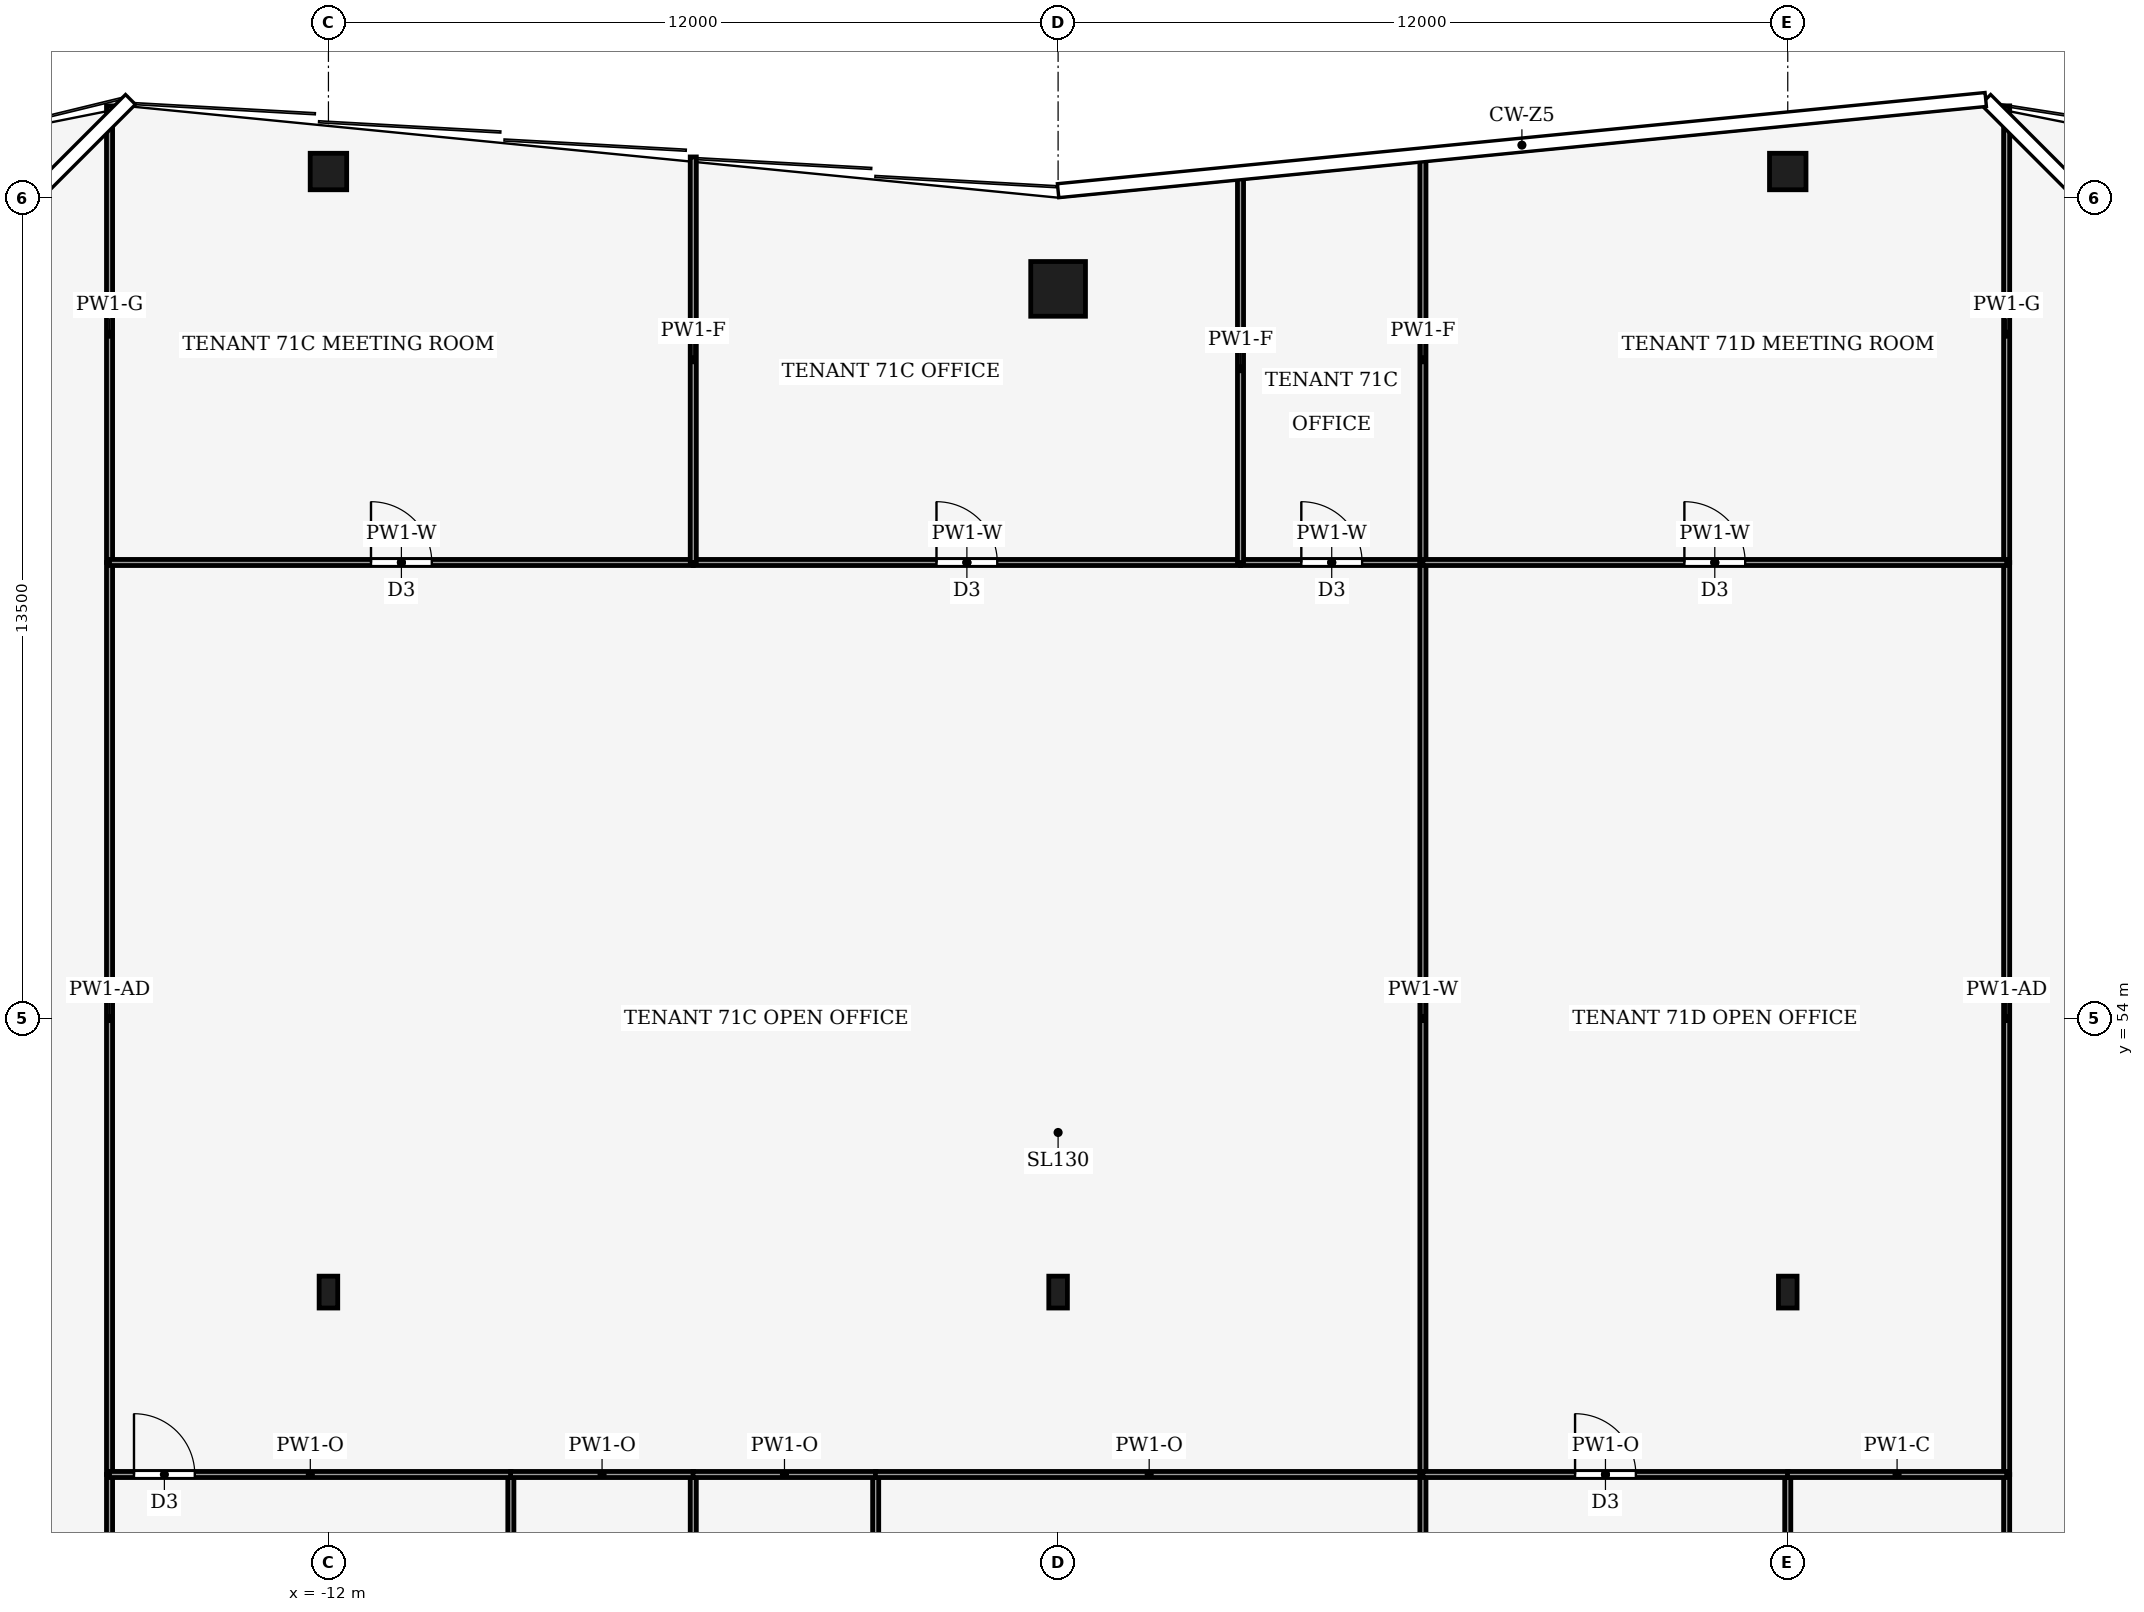
"""IFC4 building model, lengths in metres.
Left out: names, types, materials, properties, quantities, classifications, styles, units other than length and angle.
Written with IfcOpenShell. Run it as: python <this file> out.ifc"""

import sys

from ifc_helpers import new_model, si_unit, direction, frame, frame_2d, origin, origin_2d, place, context, subcontext, project, spatial, rectangle, hollow_rectangle, i_section, extrude, element, fill, save


model = new_model("IFC4")
c1 = context("Model", 3, precision=1e-05, world=origin(), true_north=direction((0.0, 1.0)))
c2 = subcontext(c1, "Body", "Model", "MODEL_VIEW")
j1 = project(units=[si_unit("LENGTHUNIT", "METRE"), si_unit("PLANEANGLEUNIT", "RADIAN")], contexts=[c1])
p1 = place(None, origin())
s1 = spatial("IfcSite", under=j1, at=p1, CompositionType="ELEMENT")
p2 = place(p1, origin())
s2 = spatial("IfcBuilding", under=s1, at=p2, CompositionType="ELEMENT")
p3 = place(p2, frame((0.0, 0.0, 310.0)))
s3 = spatial("IfcBuildingStorey", under=s2, at=p3, CompositionType="ELEMENT", Elevation=310.0)
p4 = place(p3, frame((0.0, 66.0, 0.0), z_axis=(0.0, 0.0, 1.0), x_axis=(1.0, 0.0, 0.0)))
e1 = element("IfcColumn", 1, at=p4, inside=s3, PredefinedType="COLUMN", context=c2, shape_type="SweptSolid", body=[
    extrude(hollow_rectangle(XDim=0.9, YDim=0.9, WallThickness=0.04, at=origin_2d()), origin(), (0.0, 0.0, 1.0), 4.0),
])
for number, where, z_axis, x_axis in (
    (2, (-12.0, 67.93, 0.0), (0.0, 0.0, 1.0), (1.0, 0.0, 0.0)),
    (3, (12.0, 67.93, 0.0), (0.0, 0.0, 1.0), (1.0, 0.0, 0.0)),
):
    element("IfcColumn", number, at=place(p3, frame(where, z_axis=z_axis, x_axis=x_axis)), inside=s3, PredefinedType="COLUMN", context=c2, shape_type="SweptSolid", body=[
        extrude(hollow_rectangle(XDim=0.6, YDim=0.6, WallThickness=0.025, at=origin_2d()), origin(), (0.0, 0.0, 1.0), 4.0),
    ])
for number, where, z_axis, x_axis in (
    (4, (-12.0, 49.5, 0.0), (0.0, 0.0, 1.0), (1.0, 0.0, 0.0)),
    (5, (0.0, 49.5, 0.0), (0.0, 0.0, 1.0), (1.0, 0.0, 0.0)),
    (6, (12.0, 49.5, 0.0), (0.0, 0.0, 1.0), (1.0, 0.0, 0.0)),
):
    element("IfcColumn", number, at=place(p3, frame(where, z_axis=z_axis, x_axis=x_axis)), inside=s3, PredefinedType="COLUMN", context=c2, shape_type="SweptSolid", body=[
        extrude(i_section(OverallWidth=0.306, OverallDepth=0.524, WebThickness=0.012, FlangeThickness=0.04, FilletRadius=0.027, at=origin_2d()), origin(), (0.0, 0.0, 1.0), 4.0),
    ])
p5 = place(p3, frame((-15.6, 40.6, 0.0), z_axis=(0.0, 0.0, 1.0), x_axis=(0.0, 1.0, 0.0)))
e7 = element("IfcWall", 7, at=p5, inside=s3, PredefinedType="PARTITIONING", context=c2, shape_type="SweptSolid", body=[
    extrude(rectangle(XDim=5.9, YDim=0.1, at=frame_2d((2.95, 0.0))), origin(), (0.0, 0.0, 1.0), 3.87),
])
p6 = place(p3, frame((-15.6, 46.5, 0.0), z_axis=(0.0, 0.0, 1.0), x_axis=(0.0, 1.0, 0.0)))
e8 = element("IfcWall", 8, at=p6, inside=s3, PredefinedType="PARTITIONING", context=c2, shape_type="SweptSolid", body=[
    extrude(rectangle(XDim=15.0, YDim=0.1, at=frame_2d((7.5, 0.0))), origin(), (0.0, 0.0, 1.0), 3.35),
])
p7 = place(p3, frame((-15.6, 61.5, 0.0), z_axis=(0.0, 0.0, 1.0), x_axis=(0.0, 1.0, 0.0)))
e9 = element("IfcWall", 9, at=p7, inside=s3, PredefinedType="PARTITIONING", context=c2, shape_type="SweptSolid", body=[
    extrude(rectangle(XDim=7.51, YDim=0.1, at=frame_2d((3.755, 0.0))), origin(), (0.0, 0.0, 1.0), 2.93),
])
p8 = place(p3, frame((15.6, 46.5, 0.0), z_axis=(0.0, 0.0, 1.0), x_axis=(0.0, -1.0, 0.0)))
e10 = element("IfcWall", 10, at=p8, inside=s3, PredefinedType="PARTITIONING", context=c2, shape_type="SweptSolid", body=[
    extrude(rectangle(XDim=5.9, YDim=0.1, at=frame_2d((2.95, 0.0))), origin(), (0.0, 0.0, 1.0), 3.87),
])
p9 = place(p3, frame((15.6, 61.5, 0.0), z_axis=(0.0, 0.0, 1.0), x_axis=(0.0, -1.0, 0.0)))
e11 = element("IfcWall", 11, at=p9, inside=s3, PredefinedType="PARTITIONING", context=c2, shape_type="SweptSolid", body=[
    extrude(rectangle(XDim=15.0, YDim=0.1, at=frame_2d((7.5, 0.0))), origin(), (0.0, 0.0, 1.0), 3.35),
])
p10 = place(p3, frame((15.6, 69.01, 0.0), z_axis=(0.0, 0.0, 1.0), x_axis=(0.0, -1.0, 0.0)))
e12 = element("IfcWall", 12, at=p10, inside=s3, PredefinedType="PARTITIONING", context=c2, shape_type="SweptSolid", body=[
    extrude(rectangle(XDim=7.51, YDim=0.1, at=frame_2d((3.755, 0.0))), origin(), (0.0, 0.0, 1.0), 2.93),
])
p11 = place(p3, frame((-9.0, 46.5, 0.0), z_axis=(0.0, 0.0, 1.0), x_axis=(0.0, -1.0, 0.0)))
e13 = element("IfcWall", 13, at=p11, inside=s3, PredefinedType="PARTITIONING", context=c2, shape_type="SweptSolid", body=[
    extrude(rectangle(XDim=5.9, YDim=0.1, at=frame_2d((2.95, 0.0))), origin(), (0.0, 0.0, 1.0), 3.87),
])
p12 = place(p11, frame((2.45, 0.0, 0.0)))
e14 = element("IfcOpeningElement", 14, at=p12, cuts=e13, PredefinedType="OPENING", context=c2, shape_type="SweptSolid", body=[
    extrude(rectangle(XDim=1.0, YDim=2.1, at=frame_2d((0.5, 1.05))), frame((0.0, 0.06, 0.0), z_axis=(0.0, -1.0, 0.0), x_axis=(1.0, 0.0, 0.0)), (0.0, 0.0, 1.0), 0.12),
])
p13 = place(p3, frame((-15.6, 46.5, 0.0), z_axis=(0.0, 0.0, 1.0), x_axis=(1.0, 0.0, 0.0)))
e15 = element("IfcWall", 15, at=p13, inside=s3, PredefinedType="PARTITIONING", context=c2, shape_type="SweptSolid", body=[
    extrude(rectangle(XDim=6.604, YDim=0.1, at=frame_2d((3.302, 0.0))), origin(), (0.0, 0.0, 1.0), 3.39),
])
p14 = place(p13, frame((0.402, 0.0, 0.0)))
e16 = element("IfcOpeningElement", 16, at=p14, cuts=e15, PredefinedType="OPENING", context=c2, shape_type="SweptSolid", body=[
    extrude(rectangle(XDim=1.0, YDim=2.1, at=frame_2d((0.5, 1.05))), frame((0.0, 0.06, 0.0), z_axis=(0.0, -1.0, 0.0), x_axis=(1.0, 0.0, 0.0)), (0.0, 0.0, 1.0), 0.12),
])
p15 = place(p3, frame((-6.0, 46.5, 0.0), z_axis=(0.0, 0.0, 1.0), x_axis=(0.0, -1.0, 0.0)))
e17 = element("IfcWall", 17, at=p15, inside=s3, PredefinedType="PARTITIONING", context=c2, shape_type="SweptSolid", body=[
    extrude(rectangle(XDim=5.9, YDim=0.1, at=frame_2d((2.95, 0.0))), origin(), (0.0, 0.0, 1.0), 3.87),
])
p16 = place(p15, frame((2.45, 0.0, 0.0)))
e18 = element("IfcOpeningElement", 18, at=p16, cuts=e17, PredefinedType="OPENING", context=c2, shape_type="SweptSolid", body=[
    extrude(rectangle(XDim=1.0, YDim=2.1, at=frame_2d((0.5, 1.05))), frame((0.0, 0.06, 0.0), z_axis=(0.0, -1.0, 0.0), x_axis=(1.0, 0.0, 0.0)), (0.0, 0.0, 1.0), 0.12),
])
p17 = place(p3, frame((-5.996, 46.5, 0.0), z_axis=(0.0, 0.0, 1.0), x_axis=(-1.0, 0.0, 0.0)))
e19 = element("IfcWall", 19, at=p17, inside=s3, PredefinedType="PARTITIONING", context=c2, shape_type="SweptSolid", body=[
    extrude(rectangle(XDim=3.008, YDim=0.1, at=frame_2d((1.504, 0.0))), origin(), (0.0, 0.0, 1.0), 3.39),
])
p18 = place(p3, frame((-3.0, 40.6, 0.0), z_axis=(0.0, 0.0, 1.0), x_axis=(0.0, 1.0, 0.0)))
e20 = element("IfcWall", 20, at=p18, inside=s3, PredefinedType="PARTITIONING", context=c2, shape_type="SweptSolid", body=[
    extrude(rectangle(XDim=5.9, YDim=0.1, at=frame_2d((2.95, 0.0))), origin(), (0.0, 0.0, 1.0), 3.87),
])
p19 = place(p3, frame((-2.996, 46.5, 0.0), z_axis=(0.0, 0.0, 1.0), x_axis=(-1.0, 0.0, 0.0)))
e21 = element("IfcWall", 21, at=p19, inside=s3, PredefinedType="PARTITIONING", context=c2, shape_type="SweptSolid", body=[
    extrude(rectangle(XDim=3.008, YDim=0.1, at=frame_2d((1.504, 0.0))), origin(), (0.0, 0.0, 1.0), 3.39),
])
p20 = place(p3, frame((6.0, 46.5, 0.0), z_axis=(0.0, 0.0, 1.0), x_axis=(-1.0, 0.0, 0.0)))
e22 = element("IfcWall", 22, at=p20, inside=s3, PredefinedType="PARTITIONING", context=c2, shape_type="SweptSolid", body=[
    extrude(rectangle(XDim=9.004, YDim=0.1, at=frame_2d((4.502, 0.0))), origin(), (0.0, 0.0, 1.0), 3.39),
])
p21 = place(p3, frame((6.0, 40.6, 0.0), z_axis=(0.0, 0.0, 1.0), x_axis=(0.0, 1.0, 0.0)))
e23 = element("IfcWall", 23, at=p21, inside=s3, PredefinedType="PARTITIONING", context=c2, shape_type="SweptSolid", body=[
    extrude(rectangle(XDim=5.9, YDim=0.1, at=frame_2d((2.95, 0.0))), origin(), (0.0, 0.0, 1.0), 3.87),
])
p22 = place(p3, frame((-15.6, 61.5, 0.0), z_axis=(0.0, 0.0, 1.0), x_axis=(1.0, 0.0, 0.0)))
e24 = element("IfcWall", 24, at=p22, inside=s3, PredefinedType="PARTITIONING", context=c2, shape_type="SweptSolid", body=[
    extrude(rectangle(XDim=9.6, YDim=0.1, at=frame_2d((4.8, 0.0))), origin(), (0.0, 0.0, 1.0), 3.24),
])
p23 = place(p22, frame((4.3, 0.0, 0.0)))
e25 = element("IfcOpeningElement", 25, at=p23, cuts=e24, PredefinedType="OPENING", context=c2, shape_type="SweptSolid", body=[
    extrude(rectangle(XDim=1.0, YDim=2.1, at=frame_2d((0.5, 1.05))), frame((0.0, 0.06, 0.0), z_axis=(0.0, -1.0, 0.0), x_axis=(1.0, 0.0, 0.0)), (0.0, 0.0, 1.0), 0.12),
])
p24 = place(p3, frame((-6.0, 61.5, 0.0), z_axis=(0.0, 0.0, 1.0), x_axis=(1.0, 0.0, 0.0)))
e26 = element("IfcWall", 26, at=p24, inside=s3, PredefinedType="PARTITIONING", context=c2, shape_type="SweptSolid", body=[
    extrude(rectangle(XDim=9.0, YDim=0.1, at=frame_2d((4.5, 0.0))), origin(), (0.0, 0.0, 1.0), 3.24),
])
p25 = place(p24, frame((4.0, 0.0, 0.0)))
e27 = element("IfcOpeningElement", 27, at=p25, cuts=e26, PredefinedType="OPENING", context=c2, shape_type="SweptSolid", body=[
    extrude(rectangle(XDim=1.0, YDim=2.1, at=frame_2d((0.5, 1.05))), frame((0.0, 0.06, 0.0), z_axis=(0.0, -1.0, 0.0), x_axis=(1.0, 0.0, 0.0)), (0.0, 0.0, 1.0), 0.12),
])
p26 = place(p3, frame((3.0, 61.5, 0.0), z_axis=(0.0, 0.0, 1.0), x_axis=(1.0, 0.0, 0.0)))
e28 = element("IfcWall", 28, at=p26, inside=s3, PredefinedType="PARTITIONING", context=c2, shape_type="SweptSolid", body=[
    extrude(rectangle(XDim=3.0, YDim=0.1, at=frame_2d((1.5, 0.0))), origin(), (0.0, 0.0, 1.0), 3.24),
])
p27 = place(p26, frame((1.0, 0.0, 0.0)))
e29 = element("IfcOpeningElement", 29, at=p27, cuts=e28, PredefinedType="OPENING", context=c2, shape_type="SweptSolid", body=[
    extrude(rectangle(XDim=1.0, YDim=2.1, at=frame_2d((0.5, 1.05))), frame((0.0, 0.06, 0.0), z_axis=(0.0, -1.0, 0.0), x_axis=(1.0, 0.0, 0.0)), (0.0, 0.0, 1.0), 0.12),
])
p28 = place(p3, frame((6.0, 46.5, 0.0), z_axis=(0.0, 0.0, 1.0), x_axis=(0.0, 1.0, 0.0)))
e30 = element("IfcWall", 30, at=p28, inside=s3, PredefinedType="PARTITIONING", context=c2, shape_type="SweptSolid", body=[
    extrude(rectangle(XDim=15.0, YDim=0.1, at=frame_2d((7.5, 0.0))), origin(), (0.0, 0.0, 1.0), 3.24),
])
p29 = place(p3, frame((-6.0, 61.5, 0.0), z_axis=(0.0, 0.0, 1.0), x_axis=(0.0, 1.0, 0.0)))
e31 = element("IfcWall", 31, at=p29, inside=s3, PredefinedType="PARTITIONING", context=c2, shape_type="SweptSolid", body=[
    extrude(rectangle(XDim=6.67, YDim=0.1, at=frame_2d((3.335, 0.0))), origin(), (0.0, 0.0, 1.0), 3.04),
])
p30 = place(p3, frame((3.0, 61.5, 0.0), z_axis=(0.0, 0.0, 1.0), x_axis=(0.0, 1.0, 0.0)))
e32 = element("IfcWall", 32, at=p30, inside=s3, PredefinedType="PARTITIONING", context=c2, shape_type="SweptSolid", body=[
    extrude(rectangle(XDim=6.375, YDim=0.1, at=frame_2d((3.188, 0.0))), origin(), (0.0, 0.0, 1.0), 3.04),
])
p31 = place(p3, frame((6.0, 61.5, 0.0), z_axis=(0.0, 0.0, 1.0), x_axis=(0.0, 1.0, 0.0)))
e33 = element("IfcWall", 33, at=p31, inside=s3, PredefinedType="PARTITIONING", context=c2, shape_type="SweptSolid", body=[
    extrude(rectangle(XDim=6.67, YDim=0.1, at=frame_2d((3.335, 0.0))), origin(), (0.0, 0.0, 1.0), 3.04),
])
p32 = place(p3, frame((12.0, 46.5, 0.0), z_axis=(0.0, 0.0, 1.0), x_axis=(0.0, -1.0, 0.0)))
e34 = element("IfcWall", 34, at=p32, inside=s3, PredefinedType="PARTITIONING", context=c2, shape_type="SweptSolid", body=[
    extrude(rectangle(XDim=5.9, YDim=0.1, at=frame_2d((2.95, 0.0))), origin(), (0.0, 0.0, 1.0), 3.39),
])
p33 = place(p32, frame((2.45, 0.0, 0.0)))
e35 = element("IfcOpeningElement", 35, at=p33, cuts=e34, PredefinedType="OPENING", context=c2, shape_type="SweptSolid", body=[
    extrude(rectangle(XDim=1.0, YDim=2.1, at=frame_2d((0.5, 1.05))), frame((0.0, 0.06, 0.0), z_axis=(0.0, -1.0, 0.0), x_axis=(1.0, 0.0, 0.0)), (0.0, 0.0, 1.0), 0.12),
])
p34 = place(p3, frame((6.0, 46.5, 0.0), z_axis=(0.0, 0.0, 1.0), x_axis=(1.0, 0.0, 0.0)))
e36 = element("IfcWall", 36, at=p34, inside=s3, PredefinedType="PARTITIONING", context=c2, shape_type="SweptSolid", body=[
    extrude(rectangle(XDim=6.004, YDim=0.1, at=frame_2d((3.002, 0.0))), origin(), (0.0, 0.0, 1.0), 3.39),
])
p35 = place(p34, frame((2.502, 0.0, 0.0)))
e37 = element("IfcOpeningElement", 37, at=p35, cuts=e36, PredefinedType="OPENING", context=c2, shape_type="SweptSolid", body=[
    extrude(rectangle(XDim=1.0, YDim=2.1, at=frame_2d((0.5, 1.05))), frame((0.0, 0.06, 0.0), z_axis=(0.0, -1.0, 0.0), x_axis=(1.0, 0.0, 0.0)), (0.0, 0.0, 1.0), 0.12),
])
p36 = place(p3, frame((15.6, 46.5, 0.0), z_axis=(0.0, 0.0, 1.0), x_axis=(-1.0, 0.0, 0.0)))
e38 = element("IfcWall", 38, at=p36, inside=s3, PredefinedType="PARTITIONING", context=c2, shape_type="SweptSolid", body=[
    extrude(rectangle(XDim=3.604, YDim=0.1, at=frame_2d((1.802, 0.0))), origin(), (0.0, 0.0, 1.0), 3.87),
])
p37 = place(p3, frame((6.0, 61.5, 0.0), z_axis=(0.0, 0.0, 1.0), x_axis=(1.0, 0.0, 0.0)))
e39 = element("IfcWall", 39, at=p37, inside=s3, PredefinedType="PARTITIONING", context=c2, shape_type="SweptSolid", body=[
    extrude(rectangle(XDim=9.6, YDim=0.1, at=frame_2d((4.8, 0.0))), origin(), (0.0, 0.0, 1.0), 3.24),
])
p38 = place(p37, frame((4.3, 0.0, 0.0)))
e40 = element("IfcOpeningElement", 40, at=p38, cuts=e39, PredefinedType="OPENING", context=c2, shape_type="SweptSolid", body=[
    extrude(rectangle(XDim=1.0, YDim=2.1, at=frame_2d((0.5, 1.05))), frame((0.0, 0.06, 0.0), z_axis=(0.0, -1.0, 0.0), x_axis=(1.0, 0.0, 0.0)), (0.0, 0.0, 1.0), 0.12),
])
p39 = place(p14, origin())
e41 = element("IfcDoor", 41, at=p39, inside=s3, OperationType="SINGLE_SWING_LEFT", PredefinedType="DOOR", context=c2, shape_type="SweptSolid", body=[
    extrude(rectangle(XDim=1.0, YDim=2.1, at=frame_2d((0.5, 1.05))), frame((0.0, 0.025, 0.0), z_axis=(0.0, -1.0, 0.0), x_axis=(1.0, 0.0, 0.0)), (0.0, 0.0, 1.0), 0.05),
])
fill(e16, e41)
p40 = place(p23, origin())
e42 = element("IfcDoor", 42, at=p40, inside=s3, OperationType="SINGLE_SWING_RIGHT", PredefinedType="DOOR", context=c2, shape_type="SweptSolid", body=[
    extrude(rectangle(XDim=1.0, YDim=2.1, at=frame_2d((0.5, 1.05))), frame((0.0, 0.025, 0.0), z_axis=(0.0, -1.0, 0.0), x_axis=(1.0, 0.0, 0.0)), (0.0, 0.0, 1.0), 0.05),
])
fill(e25, e42)
p41 = place(p25, origin())
e43 = element("IfcDoor", 43, at=p41, inside=s3, OperationType="SINGLE_SWING_LEFT", PredefinedType="DOOR", context=c2, shape_type="SweptSolid", body=[
    extrude(rectangle(XDim=1.0, YDim=2.1, at=frame_2d((0.5, 1.05))), frame((0.0, 0.025, 0.0), z_axis=(0.0, -1.0, 0.0), x_axis=(1.0, 0.0, 0.0)), (0.0, 0.0, 1.0), 0.05),
])
fill(e27, e43)
p42 = place(p27, origin())
e44 = element("IfcDoor", 44, at=p42, inside=s3, OperationType="SINGLE_SWING_RIGHT", PredefinedType="DOOR", context=c2, shape_type="SweptSolid", body=[
    extrude(rectangle(XDim=1.0, YDim=2.1, at=frame_2d((0.5, 1.05))), frame((0.0, 0.025, 0.0), z_axis=(0.0, -1.0, 0.0), x_axis=(1.0, 0.0, 0.0)), (0.0, 0.0, 1.0), 0.05),
])
fill(e29, e44)
p43 = place(p35, origin())
e45 = element("IfcDoor", 45, at=p43, inside=s3, OperationType="SINGLE_SWING_RIGHT", PredefinedType="DOOR", context=c2, shape_type="SweptSolid", body=[
    extrude(rectangle(XDim=1.0, YDim=2.1, at=frame_2d((0.5, 1.05))), frame((0.0, 0.025, 0.0), z_axis=(0.0, -1.0, 0.0), x_axis=(1.0, 0.0, 0.0)), (0.0, 0.0, 1.0), 0.05),
])
fill(e37, e45)
p44 = place(p38, origin())
e46 = element("IfcDoor", 46, at=p44, inside=s3, OperationType="SINGLE_SWING_LEFT", PredefinedType="DOOR", context=c2, shape_type="SweptSolid", body=[
    extrude(rectangle(XDim=1.0, YDim=2.1, at=frame_2d((0.5, 1.05))), frame((0.0, 0.025, 0.0), z_axis=(0.0, -1.0, 0.0), x_axis=(1.0, 0.0, 0.0)), (0.0, 0.0, 1.0), 0.05),
])
fill(e40, e46)
save(model, sys.argv[1])
